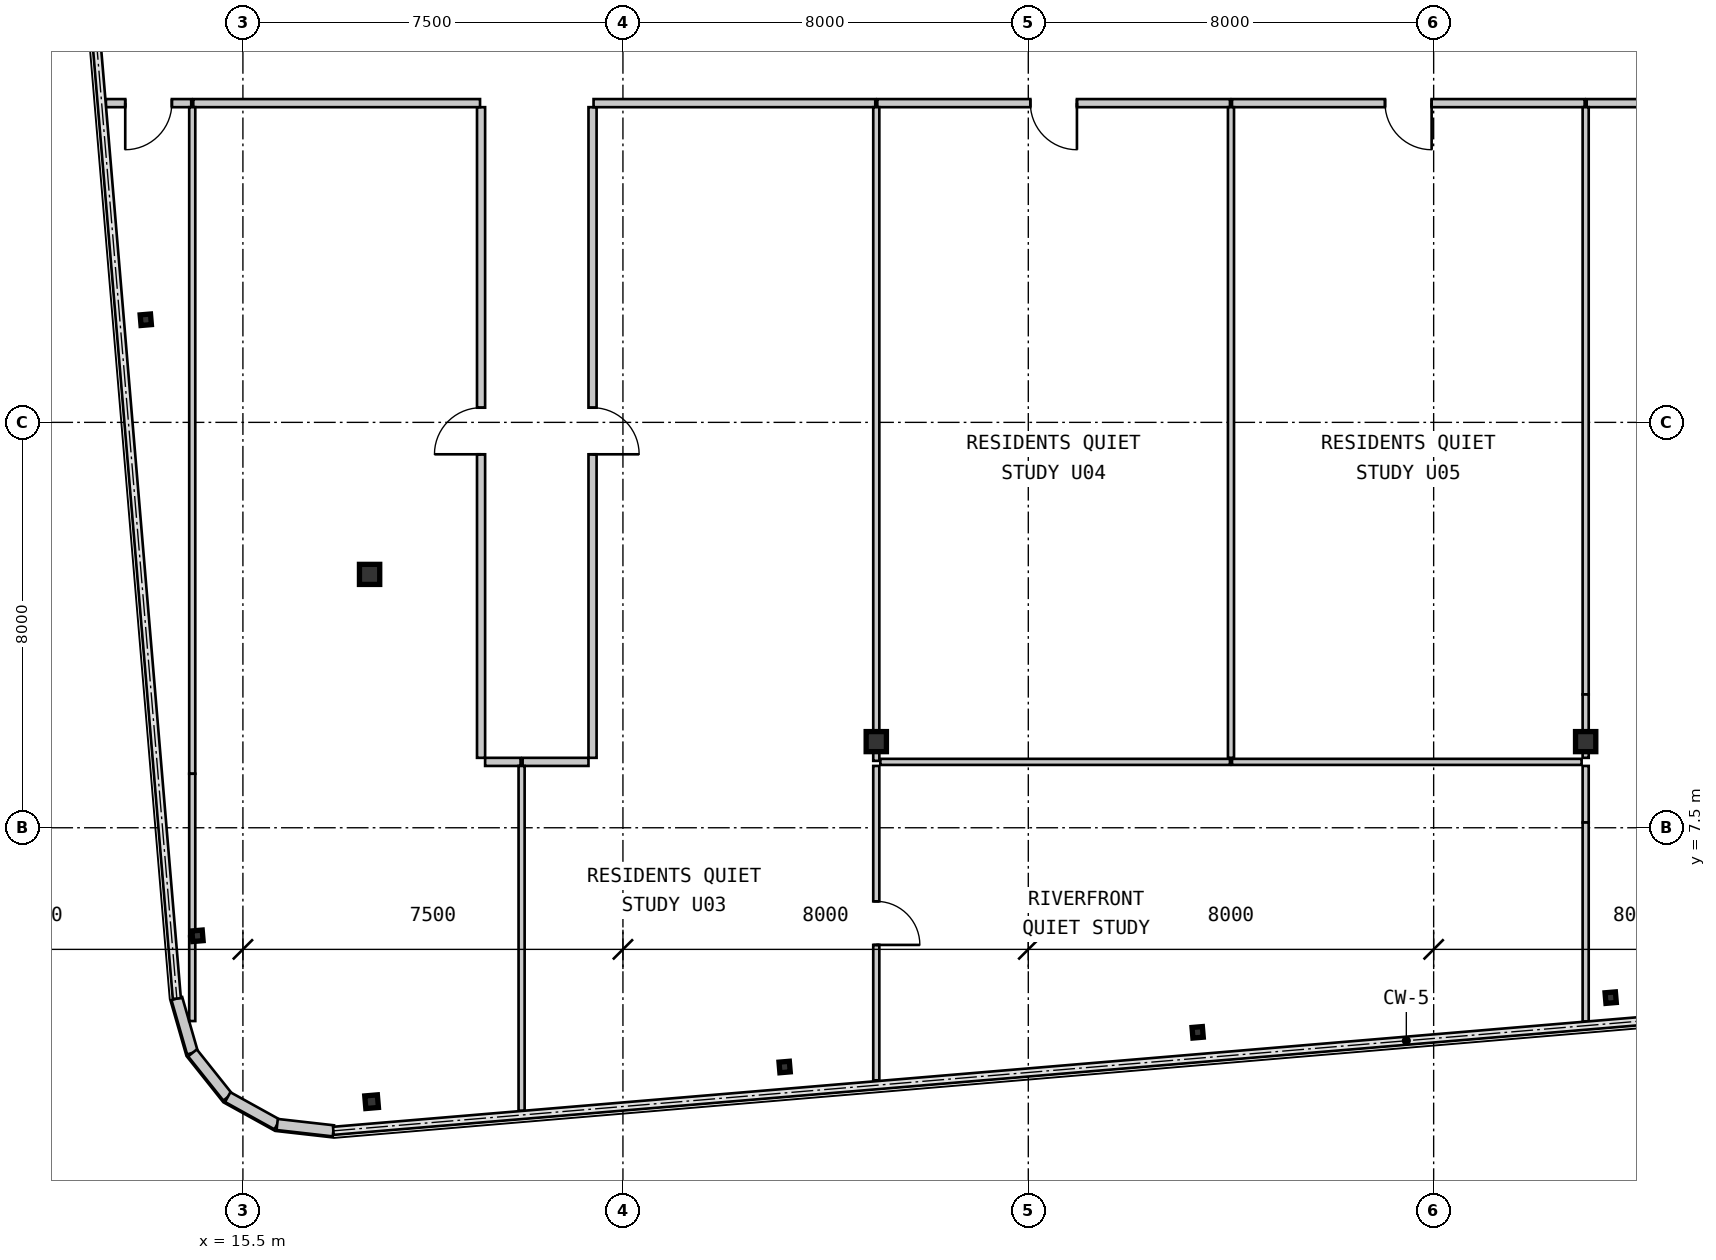
"""IFC4 building model, lengths in metres.
Left out: names, types, materials, properties, quantities, classifications, styles, units other than length and angle.
Written with IfcOpenShell. Run it as: python <this file> out.ifc"""

import sys

from ifc_helpers import new_model, si_unit, direction, frame, frame_2d, origin, origin_2d, place, context, subcontext, project, spatial, rectangle, hollow_rectangle, i_section, extrude, source, transform, mapped, element, fill, save


model = new_model("IFC4")
c1 = context("Model", 3, precision=1e-05, world=origin(), true_north=direction((0.0, 1.0)))
c2 = subcontext(c1, "Body", "Model", "MODEL_VIEW")
j1 = project(units=[si_unit("LENGTHUNIT", "METRE"), si_unit("PLANEANGLEUNIT", "RADIAN")], contexts=[c1])
p1 = place(None, origin())
s1 = spatial("IfcSite", under=j1, at=p1, CompositionType="ELEMENT")
p2 = place(p1, origin())
s2 = spatial("IfcBuilding", under=s1, at=p2, CompositionType="ELEMENT")
p3 = place(p2, frame((0.0, 0.0, 172.55)))
s3 = spatial("IfcBuildingStorey", under=s2, at=p3, CompositionType="ELEMENT", Elevation=172.55)
m1 = source(origin(), c2, "Body", "SweptSolid", [
    extrude(i_section(OverallWidth=0.4, OverallDepth=0.396, WebThickness=0.022, FlangeThickness=0.034, at=origin_2d()), origin(), (0.0, 0.0, 1.0), 3.15),
])
for number, where, z_axis, x_axis in (
    (1, (28.0, 9.2, 0.0), (0.0, 0.0, 1.0), (1.0, 0.0, 0.0)),
    (2, (42.0, 9.2, 0.0), (0.0, 0.0, 1.0), (1.0, 0.0, 0.0)),
    (3, (18.0, 12.5, 0.0), (0.0, 0.0, 1.0), (1.0, 0.0, 0.0)),
):
    element("IfcColumn", number, at=place(p3, frame(where, z_axis=z_axis, x_axis=x_axis)), inside=s3, PredefinedType="COLUMN", context=c2, shape_type="MappedRepresentation", body=[
        mapped(m1, transform((0.0, 0.0, 0.0), scale=1.0)),
    ])
m2 = source(origin(), c2, "Body", "SweptSolid", [
    extrude(hollow_rectangle(XDim=0.25, YDim=0.25, WallThickness=0.01, at=origin_2d()), origin(), (0.0, 0.0, 1.0), 3.15),
])
p4 = place(p3, frame((18.04, 2.094, 0.0), z_axis=(0.0, 0.0, 1.0), x_axis=(0.99649285925, 0.083677843332, 0.0)))
e4 = element("IfcColumn", 4, at=p4, inside=s3, PredefinedType="COLUMN", context=c2, shape_type="MappedRepresentation", body=[
    mapped(m2, transform((0.0, 0.0, 0.0), scale=1.0)),
])
m3 = source(origin(), c2, "Body", "SweptSolid", [
    extrude(i_section(OverallWidth=0.205, OverallDepth=0.21, WebThickness=0.009, FlangeThickness=0.014, at=origin_2d()), origin(), (0.0, 0.0, 1.0), 3.15),
])
for number, where, z_axis, x_axis in (
    (5, (26.191, 2.779, 0.0), (0.0, 0.0, 1.0), (0.996, 0.084, 0.0)),
    (6, (34.342, 3.463, 0.0), (0.0, 0.0, 1.0), (0.996, 0.084, 0.0)),
    (7, (42.494, 4.147, 0.0), (0.0, 0.0, 1.0), (0.996, 0.084, 0.0)),
    (8, (14.604, 5.368, 0.0), (0.0, 0.0, 1.0), (0.996, 0.084, 0.0)),
    (9, (13.583, 17.525, 0.0), (0.0, 0.0, 1.0), (0.996, 0.084, 0.0)),
):
    element("IfcColumn", number, at=place(p3, frame(where, z_axis=z_axis, x_axis=x_axis)), inside=s3, PredefinedType="COLUMN", context=c2, shape_type="MappedRepresentation", body=[
        mapped(m3, transform((0.0, 0.0, 0.0), scale=1.0)),
    ])
m4 = source(origin(), c2, "Body", "SweptSolid", [
    extrude(rectangle(XDim=1.116, YDim=0.22, at=frame_2d((0.558, 0.0))), origin(), (0.0, 0.0, 1.0), 2.93),
])
for number, where, z_axis, x_axis in (
    (10, (14.196, 4.13, 0.0), (0.0, 0.0, 1.0), (0.277, -0.961, 0.0)),
    (11, (14.504, 3.057, 0.0), (0.0, 0.0, 1.0), (0.623, -0.782, 0.0)),
    (12, (15.2, 2.184, 0.0), (0.0, 0.0, 1.0), (0.875, -0.484, 0.0)),
    (13, (16.176, 1.644, 0.0), (0.0, 0.0, 1.0), (0.994, -0.112, 0.0)),
):
    element("IfcWall", number, at=place(p3, frame(where, z_axis=z_axis, x_axis=x_axis)), inside=s3, PredefinedType="SOLIDWALL", context=c2, shape_type="MappedRepresentation", body=[
        mapped(m4, transform((0.0, 0.0, 0.0), scale=1.0)),
    ])
m5 = source(origin(), c2, "Body", "SweptSolid", [
    extrude(rectangle(XDim=1.684, YDim=0.16, at=frame_2d((0.842, 0.0))), origin(), (0.0, 0.0, 1.0), 2.93),
])
p5 = place(p3, frame((14.48, 21.8, 0.0), z_axis=(0.0, 0.0, 1.0), x_axis=(-1.0, 0.0, 0.0)))
e14 = element("IfcWall", 14, at=p5, inside=s3, PredefinedType="PARTITIONING", context=c2, shape_type="MappedRepresentation", body=[
    mapped(m5, transform((0.0, 0.0, 0.0), scale=1.0)),
])
m6 = source(origin(), c2, "Body", "SweptSolid", [
    extrude(rectangle(XDim=0.92, YDim=2.1, at=frame_2d((0.46, 1.05))), frame((0.0, 0.09, 0.0), z_axis=(0.0, -1.0, 0.0), x_axis=(1.0, 0.0, 0.0)), (0.0, 0.0, 1.0), 0.18),
])
p6 = place(p5, frame((0.382, 0.0, 0.0)))
e15 = element("IfcOpeningElement", 15, at=p6, cuts=e14, PredefinedType="OPENING", context=c2, shape_type="MappedRepresentation", body=[
    mapped(m6, transform((0.0, 0.0, 0.0), scale=1.0)),
])
m7 = source(origin(), c2, "Body", "SweptSolid", [
    extrude(rectangle(XDim=12.84, YDim=0.16, at=frame_2d((6.42, 0.0))), origin(), (0.0, 0.0, 1.0), 2.93),
])
p7 = place(p3, frame((20.2, 8.88, 0.0), z_axis=(0.0, 0.0, 1.0), x_axis=(0.0, 1.0, 0.0)))
e16 = element("IfcWall", 16, at=p7, inside=s3, PredefinedType="PARTITIONING", context=c2, shape_type="MappedRepresentation", body=[
    mapped(m7, transform((0.0, 0.0, 0.0), scale=1.0)),
])
p8 = place(p7, frame((5.99, 0.0, 0.0)))
e17 = element("IfcOpeningElement", 17, at=p8, cuts=e16, PredefinedType="OPENING", context=c2, shape_type="MappedRepresentation", body=[
    mapped(m6, transform((0.0, 0.0, 0.0), scale=1.0)),
])
m8 = source(origin(), c2, "Body", "SweptSolid", [
    extrude(rectangle(XDim=5.659, YDim=0.16, at=frame_2d((2.83, 0.0))), origin(), (0.0, 0.0, 1.0), 2.93),
])
p9 = place(p3, frame((20.18, 21.8, 0.0), z_axis=(0.0, 0.0, 1.0), x_axis=(-1.0, 0.0, 0.0)))
e18 = element("IfcWall", 18, at=p9, inside=s3, PredefinedType="PARTITIONING", context=c2, shape_type="MappedRepresentation", body=[
    mapped(m8, transform((0.0, 0.0, 0.0), scale=1.0)),
])
m9 = source(origin(), c2, "Body", "SweptSolid", [
    extrude(rectangle(XDim=0.7, YDim=0.16, at=frame_2d((0.35, 0.0))), origin(), (0.0, 0.0, 1.0), 2.93),
])
p10 = place(p3, frame((20.98, 8.8, 0.0), z_axis=(0.0, 0.0, 1.0), x_axis=(-1.0, 0.0, 0.0)))
e19 = element("IfcWall", 19, at=p10, inside=s3, PredefinedType="PARTITIONING", context=c2, shape_type="MappedRepresentation", body=[
    mapped(m9, transform((0.0, 0.0, 0.0), scale=1.0)),
])
p11 = place(p3, frame((22.4, 21.72, 0.0), z_axis=(0.0, 0.0, 1.0), x_axis=(0.0, -1.0, 0.0)))
e20 = element("IfcWall", 20, at=p11, inside=s3, PredefinedType="PARTITIONING", context=c2, shape_type="MappedRepresentation", body=[
    mapped(m7, transform((0.0, 0.0, 0.0), scale=1.0)),
])
p12 = place(p11, frame((5.93, 0.0, 0.0)))
e21 = element("IfcOpeningElement", 21, at=p12, cuts=e20, PredefinedType="OPENING", context=c2, shape_type="MappedRepresentation", body=[
    mapped(m6, transform((0.0, 0.0, 0.0), scale=1.0)),
])
m10 = source(origin(), c2, "Body", "SweptSolid", [
    extrude(rectangle(XDim=5.56, YDim=0.16, at=frame_2d((2.78, 0.0))), origin(), (0.0, 0.0, 1.0), 2.93),
])
p13 = place(p3, frame((27.98, 21.8, 0.0), z_axis=(0.0, 0.0, 1.0), x_axis=(-1.0, 0.0, 0.0)))
e22 = element("IfcWall", 22, at=p13, inside=s3, PredefinedType="PARTITIONING", context=c2, shape_type="MappedRepresentation", body=[
    mapped(m10, transform((0.0, 0.0, 0.0), scale=1.0)),
])
m11 = source(origin(), c2, "Body", "SweptSolid", [
    extrude(rectangle(XDim=1.3, YDim=0.16, at=frame_2d((0.65, 0.0))), origin(), (0.0, 0.0, 1.0), 2.93),
])
p14 = place(p3, frame((22.32, 8.8, 0.0), z_axis=(0.0, 0.0, 1.0), x_axis=(-1.0, 0.0, 0.0)))
e23 = element("IfcWall", 23, at=p14, inside=s3, PredefinedType="PARTITIONING", context=c2, shape_type="MappedRepresentation", body=[
    mapped(m11, transform((0.0, 0.0, 0.0), scale=1.0)),
])
m12 = source(origin(), c2, "Body", "SweptSolid", [
    extrude(rectangle(XDim=6.959, YDim=0.16, at=frame_2d((3.48, 0.0))), origin(), (0.0, 0.0, 1.0), 2.93),
])
p15 = place(p3, frame((34.98, 21.8, 0.0), z_axis=(0.0, 0.0, 1.0), x_axis=(-1.0, 0.0, 0.0)))
e24 = element("IfcWall", 24, at=p15, inside=s3, PredefinedType="PARTITIONING", context=c2, shape_type="MappedRepresentation", body=[
    mapped(m12, transform((0.0, 0.0, 0.0), scale=1.0)),
])
p16 = place(p15, frame((3.02, 0.0, 0.0)))
e25 = element("IfcOpeningElement", 25, at=p16, cuts=e24, PredefinedType="OPENING", context=c2, shape_type="MappedRepresentation", body=[
    mapped(m6, transform((0.0, 0.0, 0.0), scale=1.0)),
])
p17 = place(p3, frame((41.98, 21.8, 0.0), z_axis=(0.0, 0.0, 1.0), x_axis=(-1.0, 0.0, 0.0)))
e26 = element("IfcWall", 26, at=p17, inside=s3, PredefinedType="PARTITIONING", context=c2, shape_type="MappedRepresentation", body=[
    mapped(m12, transform((0.0, 0.0, 0.0), scale=1.0)),
])
p18 = place(p17, frame((3.02, 0.0, 0.0)))
e27 = element("IfcOpeningElement", 27, at=p18, cuts=e26, PredefinedType="OPENING", context=c2, shape_type="MappedRepresentation", body=[
    mapped(m6, transform((0.0, 0.0, 0.0), scale=1.0)),
])
p19 = place(p3, frame((47.58, 21.8, 0.0), z_axis=(0.0, 0.0, 1.0), x_axis=(-1.0, 0.0, 0.0)))
e28 = element("IfcWall", 28, at=p19, inside=s3, PredefinedType="PARTITIONING", context=c2, shape_type="MappedRepresentation", body=[
    mapped(m10, transform((0.0, 0.0, 0.0), scale=1.0)),
])
m13 = source(origin(), c2, "Body", "SweptSolid", [
    extrude(rectangle(XDim=6.204, YDim=0.12, at=frame_2d((3.102, 0.0))), origin(), (0.0, 0.0, 1.0), 2.93),
])
p20 = place(p3, frame((28.0, 2.516, 0.0), z_axis=(0.0, 0.0, 1.0), x_axis=(0.0, 1.0, 0.0)))
e29 = element("IfcWall", 29, at=p20, inside=s3, PredefinedType="PARTITIONING", context=c2, shape_type="MappedRepresentation", body=[
    mapped(m13, transform((0.0, 0.0, 0.0), scale=1.0)),
])
m14 = source(origin(), c2, "Body", "SweptSolid", [
    extrude(rectangle(XDim=0.86, YDim=2.1, at=frame_2d((0.43, 1.05))), frame((0.0, 0.07, 0.0), z_axis=(0.0, -1.0, 0.0), x_axis=(1.0, 0.0, 0.0)), (0.0, 0.0, 1.0), 0.14),
])
p21 = place(p20, frame((2.672, 0.0, 0.0)))
e30 = element("IfcOpeningElement", 30, at=p21, cuts=e29, PredefinedType="OPENING", context=c2, shape_type="MappedRepresentation", body=[
    mapped(m14, transform((0.0, 0.0, 0.0), scale=1.0)),
])
m15 = source(origin(), c2, "Body", "SweptSolid", [
    extrude(rectangle(XDim=6.9, YDim=0.12, at=frame_2d((3.45, 0.0))), origin(), (0.0, 0.0, 1.0), 2.93),
])
for number, where, z_axis, x_axis in (
    (31, (28.08, 8.8, 0.0), (0.0, 0.0, 1.0), (1.0, 0.0, 0.0)),
    (32, (35.02, 8.8, 0.0), (0.0, 0.0, 1.0), (1.0, 0.0, 0.0)),
):
    element("IfcWall", number, at=place(p3, frame(where, z_axis=z_axis, x_axis=x_axis)), inside=s3, PredefinedType="PARTITIONING", context=c2, shape_type="MappedRepresentation", body=[
        mapped(m15, transform((0.0, 0.0, 0.0), scale=1.0)),
    ])
m16 = source(origin(), c2, "Body", "SweptSolid", [
    extrude(rectangle(XDim=1.116, YDim=0.12, at=frame_2d((0.558, 0.0))), origin(), (0.0, 0.0, 1.0), 2.47),
])
p22 = place(p3, frame((42.0, 8.72, 0.0), z_axis=(0.0, 0.0, 1.0), x_axis=(0.0, -1.0, 0.0)))
e33 = element("IfcWall", 33, at=p22, inside=s3, PredefinedType="PARTITIONING", context=c2, shape_type="MappedRepresentation", body=[
    mapped(m16, transform((0.0, 0.0, 0.0), scale=1.0)),
])
m17 = source(origin(), c2, "Body", "SweptSolid", [
    extrude(rectangle(XDim=3.926, YDim=0.12, at=frame_2d((1.963, 0.0))), origin(), (0.0, 0.0, 1.0), 2.93),
])
p23 = place(p3, frame((42.0, 7.604, 0.0), z_axis=(0.0, 0.0, 1.0), x_axis=(0.0, -1.0, 0.0)))
e34 = element("IfcWall", 34, at=p23, inside=s3, PredefinedType="PARTITIONING", context=c2, shape_type="MappedRepresentation", body=[
    mapped(m17, transform((0.0, 0.0, 0.0), scale=1.0)),
])
m18 = source(origin(), c2, "Body", "SweptSolid", [
    extrude(rectangle(XDim=13.155, YDim=0.12, at=frame_2d((6.577, 0.0))), origin(), (0.0, 0.0, 1.0), 2.93),
])
p24 = place(p3, frame((14.5, 21.72, 0.0), z_axis=(0.0, 0.0, 1.0), x_axis=(0.0, -1.0, 0.0)))
e35 = element("IfcWall", 35, at=p24, inside=s3, PredefinedType="PARTITIONING", context=c2, shape_type="MappedRepresentation", body=[
    mapped(m18, transform((0.0, 0.0, 0.0), scale=1.0)),
])
m19 = source(origin(), c2, "Body", "SweptSolid", [
    extrude(rectangle(XDim=3.206, YDim=0.12, at=frame_2d((1.603, 0.0))), origin(), (0.0, 0.0, 1.0), 2.402),
])
p25 = place(p3, frame((14.5, 8.565, 0.0), z_axis=(0.0, 0.0, 1.0), x_axis=(0.0, -1.0, 0.0)))
e36 = element("IfcWall", 36, at=p25, inside=s3, PredefinedType="PARTITIONING", context=c2, shape_type="MappedRepresentation", body=[
    mapped(m19, transform((0.0, 0.0, 0.0), scale=1.0)),
])
m20 = source(origin(), c2, "Body", "SweptSolid", [
    extrude(rectangle(XDim=1.674, YDim=0.12, at=frame_2d((0.837, 0.0))), origin(), (0.0, 0.0, 1.0), 2.93),
])
p26 = place(p3, frame((14.5, 5.359, 0.0), z_axis=(0.0, 0.0, 1.0), x_axis=(0.0, -1.0, 0.0)))
e37 = element("IfcWall", 37, at=p26, inside=s3, PredefinedType="PARTITIONING", context=c2, shape_type="MappedRepresentation", body=[
    mapped(m20, transform((0.0, 0.0, 0.0), scale=1.0)),
])
m21 = source(origin(), c2, "Body", "SweptSolid", [
    extrude(rectangle(XDim=6.806, YDim=0.12, at=frame_2d((3.403, 0.0))), origin(), (0.0, 0.0, 1.0), 2.93),
])
p27 = place(p3, frame((21.0, 8.72, 0.0), z_axis=(0.0, 0.0, 1.0), x_axis=(0.0, -1.0, 0.0)))
e38 = element("IfcWall", 38, at=p27, inside=s3, PredefinedType="PARTITIONING", context=c2, shape_type="MappedRepresentation", body=[
    mapped(m21, transform((0.0, 0.0, 0.0), scale=1.0)),
])
m22 = source(origin(), c2, "Body", "SweptSolid", [
    extrude(rectangle(XDim=12.52, YDim=0.12, at=frame_2d((6.26, 0.0))), origin(), (0.0, 0.0, 1.0), 2.328),
])
p28 = place(p3, frame((28.0, 21.72, 0.0), z_axis=(0.0, 0.0, 1.0), x_axis=(0.0, -1.0, 0.0)))
e39 = element("IfcWall", 39, at=p28, inside=s3, PredefinedType="PARTITIONING", context=c2, shape_type="MappedRepresentation", body=[
    mapped(m22, transform((0.0, 0.0, 0.0), scale=1.0)),
])
m23 = source(origin(), c2, "Body", "SweptSolid", [
    extrude(rectangle(XDim=0.38, YDim=0.12, at=frame_2d((0.19, 0.0))), origin(), (0.0, 0.0, 1.0), 2.93),
])
p29 = place(p3, frame((28.0, 9.2, 0.0), z_axis=(0.0, 0.0, 1.0), x_axis=(0.0, -1.0, 0.0)))
e40 = element("IfcWall", 40, at=p29, inside=s3, PredefinedType="PARTITIONING", context=c2, shape_type="MappedRepresentation", body=[
    mapped(m23, transform((0.0, 0.0, 0.0), scale=1.0)),
])
m24 = source(origin(), c2, "Body", "SweptSolid", [
    extrude(rectangle(XDim=12.84, YDim=0.12, at=frame_2d((6.42, 0.0))), origin(), (0.0, 0.0, 1.0), 2.93),
])
p30 = place(p3, frame((35.0, 21.72, 0.0), z_axis=(0.0, 0.0, 1.0), x_axis=(0.0, -1.0, 0.0)))
e41 = element("IfcWall", 41, at=p30, inside=s3, PredefinedType="PARTITIONING", context=c2, shape_type="MappedRepresentation", body=[
    mapped(m24, transform((0.0, 0.0, 0.0), scale=1.0)),
])
m25 = source(origin(), c2, "Body", "SweptSolid", [
    extrude(rectangle(XDim=11.59, YDim=0.12, at=frame_2d((5.795, 0.0))), origin(), (0.0, 0.0, 1.0), 2.93),
])
p31 = place(p3, frame((42.0, 21.72, 0.0), z_axis=(0.0, 0.0, 1.0), x_axis=(0.0, -1.0, 0.0)))
e42 = element("IfcWall", 42, at=p31, inside=s3, PredefinedType="PARTITIONING", context=c2, shape_type="MappedRepresentation", body=[
    mapped(m25, transform((0.0, 0.0, 0.0), scale=1.0)),
])
m26 = source(origin(), c2, "Body", "SweptSolid", [
    extrude(rectangle(XDim=0.942, YDim=0.12, at=frame_2d((0.471, 0.0))), origin(), (0.0, 0.0, 1.0), 2.328),
])
p32 = place(p3, frame((42.0, 10.13, 0.0), z_axis=(0.0, 0.0, 1.0), x_axis=(0.0, -1.0, 0.0)))
e43 = element("IfcWall", 43, at=p32, inside=s3, PredefinedType="PARTITIONING", context=c2, shape_type="MappedRepresentation", body=[
    mapped(m26, transform((0.0, 0.0, 0.0), scale=1.0)),
])
m27 = source(origin(), c2, "Body", "SweptSolid", [
    extrude(rectangle(XDim=0.309, YDim=0.12, at=frame_2d((0.154, 0.0))), origin(), (0.0, 0.0, 1.0), 2.93),
])
p33 = place(p3, frame((42.0, 9.189, 0.0), z_axis=(0.0, 0.0, 1.0), x_axis=(0.0, -1.0, 0.0)))
e44 = element("IfcWall", 44, at=p33, inside=s3, PredefinedType="PARTITIONING", context=c2, shape_type="MappedRepresentation", body=[
    mapped(m27, transform((0.0, 0.0, 0.0), scale=1.0)),
])
m28 = source(origin(), c2, "Body", "SweptSolid", [
    extrude(rectangle(XDim=0.92, YDim=2.1, at=frame_2d((0.46, 1.05))), frame((0.0, 0.025, 0.0), z_axis=(0.0, -1.0, 0.0), x_axis=(1.0, 0.0, 0.0)), (0.0, 0.0, 1.0), 0.05),
])
p34 = place(p6, origin())
e45 = element("IfcDoor", 45, at=p34, inside=s3, OperationType="SINGLE_SWING_RIGHT", PredefinedType="DOOR", context=c2, shape_type="MappedRepresentation", body=[
    mapped(m28, transform((0.0, 0.0, 0.0), scale=1.0)),
])
fill(e15, e45)
p35 = place(p8, origin())
e46 = element("IfcDoor", 46, at=p35, inside=s3, OperationType="SINGLE_SWING_LEFT", PredefinedType="DOOR", context=c2, shape_type="MappedRepresentation", body=[
    mapped(m28, transform((0.0, 0.0, 0.0), scale=1.0)),
])
fill(e17, e46)
p36 = place(p12, origin())
e47 = element("IfcDoor", 47, at=p36, inside=s3, OperationType="SINGLE_SWING_RIGHT", PredefinedType="DOOR", context=c2, shape_type="MappedRepresentation", body=[
    mapped(m28, transform((0.0, 0.0, 0.0), scale=1.0)),
])
fill(e21, e47)
p37 = place(p16, origin())
e48 = element("IfcDoor", 48, at=p37, inside=s3, OperationType="SINGLE_SWING_LEFT", PredefinedType="DOOR", context=c2, shape_type="MappedRepresentation", body=[
    mapped(m28, transform((0.0, 0.0, 0.0), scale=1.0)),
])
fill(e25, e48)
p38 = place(p18, origin())
e49 = element("IfcDoor", 49, at=p38, inside=s3, OperationType="SINGLE_SWING_LEFT", PredefinedType="DOOR", context=c2, shape_type="MappedRepresentation", body=[
    mapped(m28, transform((0.0, 0.0, 0.0), scale=1.0)),
])
fill(e27, e49)
m29 = source(origin(), c2, "Body", "SweptSolid", [
    extrude(rectangle(XDim=0.86, YDim=2.1, at=frame_2d((0.43, 1.05))), frame((0.0, 0.025, 0.0), z_axis=(0.0, -1.0, 0.0), x_axis=(1.0, 0.0, 0.0)), (0.0, 0.0, 1.0), 0.05),
])
p39 = place(p21, frame((0.86, 0.0, 0.0), z_axis=(0.0, 0.0, 1.0), x_axis=(-1.0, 0.0, 0.0)))
e50 = element("IfcDoor", 50, at=p39, inside=s3, OperationType="SINGLE_SWING_RIGHT", PredefinedType="DOOR", context=c2, shape_type="MappedRepresentation", body=[
    mapped(m29, transform((0.0, 0.0, 0.0), scale=1.0)),
])
fill(e30, e50)
save(model, sys.argv[1])
